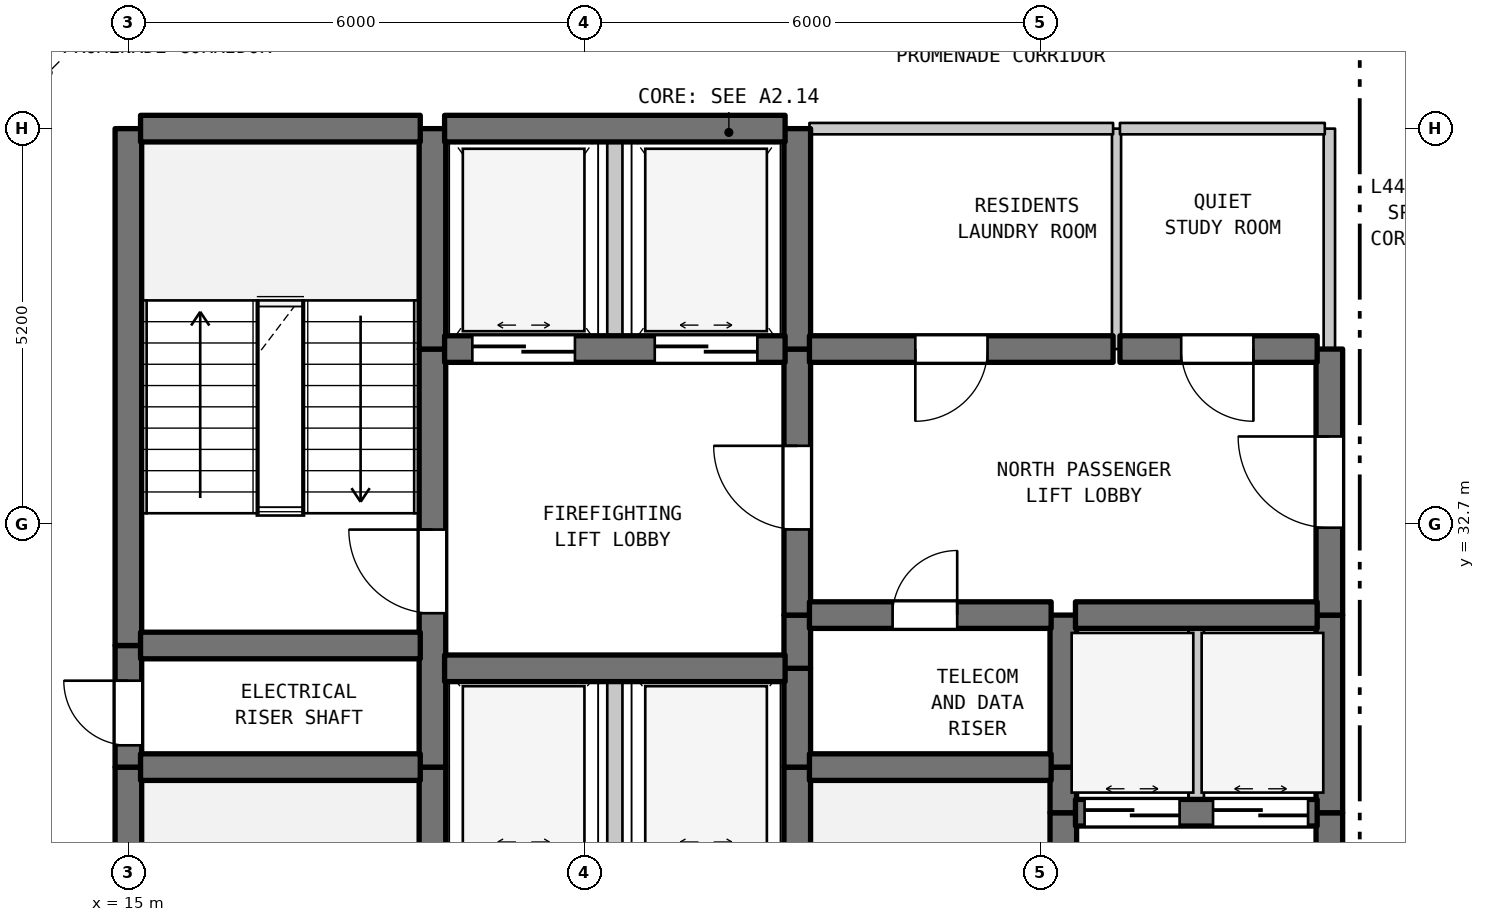
"""IFC4 building model, lengths in metres.
Left out: names, types, materials, properties, quantities, classifications, styles, units other than length and angle.
Written with IfcOpenShell. Run it as: python <this file> out.ifc"""

import sys

from ifc_helpers import new_model, si_unit, direction, frame, frame_2d, origin, place, context, subcontext, project, spatial, rectangle, extrude, element, fill, save


model = new_model("IFC4")
c1 = context("Model", 3, precision=1e-05, world=origin(), true_north=direction((0.0, 1.0)))
c2 = subcontext(c1, "Body", "Model", "MODEL_VIEW")
j1 = project(units=[si_unit("LENGTHUNIT", "METRE"), si_unit("PLANEANGLEUNIT", "RADIAN")], contexts=[c1])
p1 = place(None, origin())
s1 = spatial("IfcSite", under=j1, at=p1, CompositionType="ELEMENT")
p2 = place(p1, origin())
s2 = spatial("IfcBuilding", under=s1, at=p2, CompositionType="ELEMENT")
p3 = place(p2, frame((0.0, 0.0, 180.2)))
s3 = spatial("IfcBuildingStorey", under=s2, at=p3, CompositionType="ELEMENT", Elevation=180.2)
p4 = place(p3, frame((15.0, 22.7, 0.0), z_axis=(0.0, 0.0, 1.0), x_axis=(0.0, 1.0, 0.0)))
e1 = element("IfcWall", 1, at=p4, inside=s3, PredefinedType="SHEAR", context=c2, shape_type="SweptSolid", body=[
    extrude(rectangle(XDim=6.8, YDim=0.35, at=frame_2d((3.4, 0.0))), origin(), (0.0, 0.0, 1.0), 3.38),
])
p5 = place(p3, frame((15.0, 29.5, 0.0), z_axis=(0.0, 0.0, 1.0), x_axis=(0.0, 1.0, 0.0)))
e2 = element("IfcWall", 2, at=p5, inside=s3, PredefinedType="SHEAR", context=c2, shape_type="SweptSolid", body=[
    extrude(rectangle(XDim=1.6, YDim=0.35, at=frame_2d((0.8, 0.0))), origin(), (0.0, 0.0, 1.0), 3.38),
])
p6 = place(p5, frame((0.287, 0.0, 0.0)))
e3 = element("IfcOpeningElement", 3, at=p6, cuts=e2, PredefinedType="OPENING", context=c2, shape_type="SweptSolid", body=[
    extrude(rectangle(XDim=0.85, YDim=2.1, at=frame_2d((0.425, 1.05))), frame((0.0, 0.185, 0.0), z_axis=(0.0, -1.0, 0.0), x_axis=(1.0, 0.0, 0.0)), (0.0, 0.0, 1.0), 0.37),
])
p7 = place(p3, frame((15.0, 31.1, 0.0), z_axis=(0.0, 0.0, 1.0), x_axis=(0.0, 1.0, 0.0)))
e4 = element("IfcWall", 4, at=p7, inside=s3, PredefinedType="SHEAR", context=c2, shape_type="SweptSolid", body=[
    extrude(rectangle(XDim=6.8, YDim=0.35, at=frame_2d((3.4, 0.0))), origin(), (0.0, 0.0, 1.0), 3.38),
])
p8 = place(p3, frame((19.0, 28.2, 0.0), z_axis=(0.0, 0.0, 1.0), x_axis=(0.0, 1.0, 0.0)))
e5 = element("IfcWall", 5, at=p8, inside=s3, PredefinedType="SHEAR", context=c2, shape_type="SweptSolid", body=[
    extrude(rectangle(XDim=1.3, YDim=0.35, at=frame_2d((0.65, 0.0))), origin(), (0.0, 0.0, 1.0), 3.38),
])
p9 = place(p3, frame((19.0, 29.5, 0.0), z_axis=(0.0, 0.0, 1.0), x_axis=(0.0, 1.0, 0.0)))
e6 = element("IfcWall", 6, at=p9, inside=s3, PredefinedType="SHEAR", context=c2, shape_type="SweptSolid", body=[
    extrude(rectangle(XDim=5.5, YDim=0.35, at=frame_2d((2.75, 0.0))), origin(), (0.0, 0.0, 1.0), 3.38),
])
p10 = place(p9, frame((2.025, 0.0, 0.0)))
e7 = element("IfcOpeningElement", 7, at=p10, cuts=e6, PredefinedType="OPENING", context=c2, shape_type="SweptSolid", body=[
    extrude(rectangle(XDim=1.1, YDim=2.15, at=frame_2d((0.55, 1.075))), frame((0.0, 0.185, 0.0), z_axis=(0.0, -1.0, 0.0), x_axis=(1.0, 0.0, 0.0)), (0.0, 0.0, 1.0), 0.37),
])
p11 = place(p3, frame((19.0, 35.0, 0.0), z_axis=(0.0, 0.0, 1.0), x_axis=(0.0, 1.0, 0.0)))
e8 = element("IfcWall", 8, at=p11, inside=s3, PredefinedType="SHEAR", context=c2, shape_type="SweptSolid", body=[
    extrude(rectangle(XDim=2.9, YDim=0.35, at=frame_2d((1.45, 0.0))), origin(), (0.0, 0.0, 1.0), 3.38),
])
p12 = place(p3, frame((21.4, 28.2, 0.0), z_axis=(0.0, 0.0, 1.0), x_axis=(0.0, 1.0, 0.0)))
e9 = element("IfcWall", 9, at=p12, inside=s3, PredefinedType="STANDARD", context=c2, shape_type="SweptSolid", body=[
    extrude(rectangle(XDim=2.6, YDim=0.2, at=frame_2d((1.3, 0.0))), origin(), (0.0, 0.0, 1.0), 3.38),
])
p13 = place(p3, frame((21.4, 35.0, 0.0), z_axis=(0.0, 0.0, 1.0), x_axis=(0.0, 1.0, 0.0)))
e10 = element("IfcWall", 10, at=p13, inside=s3, PredefinedType="STANDARD", context=c2, shape_type="SweptSolid", body=[
    extrude(rectangle(XDim=2.9, YDim=0.2, at=frame_2d((1.45, 0.0))), origin(), (0.0, 0.0, 1.0), 3.38),
])
for number, where, z_axis, x_axis in (
    (11, (23.8, 28.2, 0.0), (0.0, 0.0, 1.0), (0.0, 1.0, 0.0)),
    (12, (23.8, 29.5, 0.0), (0.0, 0.0, 1.0), (0.0, 1.0, 0.0)),
):
    element("IfcWall", number, at=place(p3, frame(where, z_axis=z_axis, x_axis=x_axis)), inside=s3, PredefinedType="SHEAR", context=c2, shape_type="SweptSolid", body=[
        extrude(rectangle(XDim=1.3, YDim=0.35, at=frame_2d((0.65, 0.0))), origin(), (0.0, 0.0, 1.0), 3.38),
    ])
p14 = place(p3, frame((23.8, 30.8, 0.0), z_axis=(0.0, 0.0, 1.0), x_axis=(0.0, 1.0, 0.0)))
e13 = element("IfcWall", 13, at=p14, inside=s3, PredefinedType="SHEAR", context=c2, shape_type="SweptSolid", body=[
    extrude(rectangle(XDim=0.7, YDim=0.35, at=frame_2d((0.35, 0.0))), origin(), (0.0, 0.0, 1.0), 3.38),
])
p15 = place(p3, frame((23.8, 31.5, 0.0), z_axis=(0.0, 0.0, 1.0), x_axis=(0.0, 1.0, 0.0)))
e14 = element("IfcWall", 14, at=p15, inside=s3, PredefinedType="SHEAR", context=c2, shape_type="SweptSolid", body=[
    extrude(rectangle(XDim=3.5, YDim=0.35, at=frame_2d((1.75, 0.0))), origin(), (0.0, 0.0, 1.0), 3.38),
])
p16 = place(p15, frame((1.127, 0.0, 0.0)))
e15 = element("IfcOpeningElement", 15, at=p16, cuts=e14, PredefinedType="OPENING", context=c2, shape_type="SweptSolid", body=[
    extrude(rectangle(XDim=1.1, YDim=2.15, at=frame_2d((0.55, 1.075))), frame((0.0, 0.185, 0.0), z_axis=(0.0, -1.0, 0.0), x_axis=(1.0, 0.0, 0.0)), (0.0, 0.0, 1.0), 0.37),
])
p17 = place(p3, frame((23.8, 35.0, 0.0), z_axis=(0.0, 0.0, 1.0), x_axis=(0.0, 1.0, 0.0)))
e16 = element("IfcWall", 16, at=p17, inside=s3, PredefinedType="SHEAR", context=c2, shape_type="SweptSolid", body=[
    extrude(rectangle(XDim=2.9, YDim=0.35, at=frame_2d((1.45, 0.0))), origin(), (0.0, 0.0, 1.0), 3.38),
])
p18 = place(p3, frame((27.3, 25.6, 0.0), z_axis=(0.0, 0.0, 1.0), x_axis=(0.0, 1.0, 0.0)))
e17 = element("IfcWall", 17, at=p18, inside=s3, PredefinedType="SHEAR", context=c2, shape_type="SweptSolid", body=[
    extrude(rectangle(XDim=3.3, YDim=0.35, at=frame_2d((1.65, 0.0))), origin(), (0.0, 0.0, 1.0), 3.38),
])
p19 = place(p3, frame((27.3, 28.9, 0.0), z_axis=(0.0, 0.0, 1.0), x_axis=(0.0, 1.0, 0.0)))
e18 = element("IfcWall", 18, at=p19, inside=s3, PredefinedType="SHEAR", context=c2, shape_type="SweptSolid", body=[
    extrude(rectangle(XDim=0.6, YDim=0.35, at=frame_2d((0.3, 0.0))), origin(), (0.0, 0.0, 1.0), 3.38),
])
p20 = place(p3, frame((27.3, 29.5, 0.0), z_axis=(0.0, 0.0, 1.0), x_axis=(0.0, 1.0, 0.0)))
e19 = element("IfcWall", 19, at=p20, inside=s3, PredefinedType="SHEAR", context=c2, shape_type="SweptSolid", body=[
    extrude(rectangle(XDim=2.0, YDim=0.35, at=frame_2d((1.0, 0.0))), origin(), (0.0, 0.0, 1.0), 3.38),
])
p21 = place(p3, frame((28.0, 35.0, 0.0), z_axis=(0.0, 0.0, 1.0), x_axis=(0.0, 1.0, 0.0)))
e20 = element("IfcWall", 20, at=p21, inside=s3, PredefinedType="PARTITIONING", context=c2, shape_type="SweptSolid", body=[
    extrude(rectangle(XDim=2.9, YDim=0.12, at=frame_2d((1.45, 0.0))), origin(), (0.0, 0.0, 1.0), 3.38),
])
p22 = place(p3, frame((29.05, 28.9, 0.0), z_axis=(0.0, 0.0, 1.0), x_axis=(0.0, 1.0, 0.0)))
e21 = element("IfcWall", 21, at=p22, inside=s3, PredefinedType="STANDARD", context=c2, shape_type="SweptSolid", body=[
    extrude(rectangle(XDim=2.6, YDim=0.2, at=frame_2d((1.3, 0.0))), origin(), (0.0, 0.0, 1.0), 3.38),
])
p23 = place(p3, frame((30.8, 25.6, 0.0), z_axis=(0.0, 0.0, 1.0), x_axis=(0.0, 1.0, 0.0)))
e22 = element("IfcWall", 22, at=p23, inside=s3, PredefinedType="SHEAR", context=c2, shape_type="SweptSolid", body=[
    extrude(rectangle(XDim=3.3, YDim=0.35, at=frame_2d((1.65, 0.0))), origin(), (0.0, 0.0, 1.0), 3.38),
])
p24 = place(p23, frame((0.978, 0.0, 0.0)))
e23 = element("IfcOpeningElement", 23, at=p24, cuts=e22, PredefinedType="OPENING", context=c2, shape_type="SweptSolid", body=[
    extrude(rectangle(XDim=1.2, YDim=2.2, at=frame_2d((0.6, 1.1))), frame((0.0, 0.185, 0.0), z_axis=(0.0, -1.0, 0.0), x_axis=(1.0, 0.0, 0.0)), (0.0, 0.0, 1.0), 0.37),
])
p25 = place(p3, frame((30.8, 28.9, 0.0), z_axis=(0.0, 0.0, 1.0), x_axis=(0.0, 1.0, 0.0)))
e24 = element("IfcWall", 24, at=p25, inside=s3, PredefinedType="SHEAR", context=c2, shape_type="SweptSolid", body=[
    extrude(rectangle(XDim=2.6, YDim=0.35, at=frame_2d((1.3, 0.0))), origin(), (0.0, 0.0, 1.0), 3.38),
])
p26 = place(p3, frame((30.8, 31.5, 0.0), z_axis=(0.0, 0.0, 1.0), x_axis=(0.0, 1.0, 0.0)))
e25 = element("IfcWall", 25, at=p26, inside=s3, PredefinedType="SHEAR", context=c2, shape_type="SweptSolid", body=[
    extrude(rectangle(XDim=3.5, YDim=0.35, at=frame_2d((1.75, 0.0))), origin(), (0.0, 0.0, 1.0), 3.38),
])
p27 = place(p26, frame((1.15, 0.0, 0.0)))
e26 = element("IfcOpeningElement", 26, at=p27, cuts=e25, PredefinedType="OPENING", context=c2, shape_type="SweptSolid", body=[
    extrude(rectangle(XDim=1.2, YDim=2.2, at=frame_2d((0.6, 1.1))), frame((0.0, 0.185, 0.0), z_axis=(0.0, -1.0, 0.0), x_axis=(1.0, 0.0, 0.0)), (0.0, 0.0, 1.0), 0.37),
])
p28 = place(p3, frame((30.8, 35.0, 0.0), z_axis=(0.0, 0.0, 1.0), x_axis=(0.0, 1.0, 0.0)))
e27 = element("IfcWall", 27, at=p28, inside=s3, PredefinedType="STANDARD", context=c2, shape_type="SweptSolid", body=[
    extrude(rectangle(XDim=2.9, YDim=0.15, at=frame_2d((1.45, 0.0))), origin(), (0.0, 0.0, 1.0), 3.38),
])
p29 = place(p3, frame((27.46, 28.9, 0.0), z_axis=(0.0, 0.0, 1.0), x_axis=(1.0, 0.0, 0.0)))
e28 = element("IfcWall", 28, at=p29, inside=s3, PredefinedType="SHEAR", context=c2, shape_type="SweptSolid", body=[
    extrude(rectangle(XDim=3.18, YDim=0.35, at=frame_2d((1.59, 0.0))), origin(), (0.0, 0.0, 1.0), 3.38),
])
p30 = place(p29, frame((0.12, 0.0, 0.0)))
e29 = element("IfcOpeningElement", 29, at=p30, cuts=e28, PredefinedType="OPENING", context=c2, shape_type="SweptSolid", body=[
    extrude(rectangle(XDim=1.25, YDim=2.2, at=frame_2d((0.625, 1.1))), frame((0.0, 0.185, 0.0), z_axis=(0.0, -1.0, 0.0), x_axis=(1.0, 0.0, 0.0)), (0.0, 0.0, 1.0), 0.37),
])
p31 = place(p29, frame((1.81, 0.0, 0.0)))
e30 = element("IfcOpeningElement", 30, at=p31, cuts=e28, PredefinedType="OPENING", context=c2, shape_type="SweptSolid", body=[
    extrude(rectangle(XDim=1.25, YDim=2.2, at=frame_2d((0.625, 1.1))), frame((0.0, 0.185, 0.0), z_axis=(0.0, -1.0, 0.0), x_axis=(1.0, 0.0, 0.0)), (0.0, 0.0, 1.0), 0.37),
])
p32 = place(p3, frame((15.16, 29.5, 0.0), z_axis=(0.0, 0.0, 1.0), x_axis=(1.0, 0.0, 0.0)))
e31 = element("IfcWall", 31, at=p32, inside=s3, PredefinedType="SHEAR", context=c2, shape_type="SweptSolid", body=[
    extrude(rectangle(XDim=3.68, YDim=0.35, at=frame_2d((1.84, 0.0))), origin(), (0.0, 0.0, 1.0), 3.38),
])
p33 = place(p3, frame((23.96, 29.5, 0.0), z_axis=(0.0, 0.0, 1.0), x_axis=(1.0, 0.0, 0.0)))
e32 = element("IfcWall", 32, at=p33, inside=s3, PredefinedType="SHEAR", context=c2, shape_type="SweptSolid", body=[
    extrude(rectangle(XDim=3.18, YDim=0.35, at=frame_2d((1.59, 0.0))), origin(), (0.0, 0.0, 1.0), 3.38),
])
p34 = place(p3, frame((19.16, 30.8, 0.0), z_axis=(0.0, 0.0, 1.0), x_axis=(1.0, 0.0, 0.0)))
e33 = element("IfcWall", 33, at=p34, inside=s3, PredefinedType="SHEAR", context=c2, shape_type="SweptSolid", body=[
    extrude(rectangle(XDim=4.48, YDim=0.35, at=frame_2d((2.24, 0.0))), origin(), (0.0, 0.0, 1.0), 3.38),
])
p35 = place(p3, frame((15.16, 31.1, 0.0), z_axis=(0.0, 0.0, 1.0), x_axis=(1.0, 0.0, 0.0)))
e34 = element("IfcWall", 34, at=p35, inside=s3, PredefinedType="SHEAR", context=c2, shape_type="SweptSolid", body=[
    extrude(rectangle(XDim=3.68, YDim=0.35, at=frame_2d((1.84, 0.0))), origin(), (0.0, 0.0, 1.0), 3.38),
])
p36 = place(p3, frame((23.96, 31.5, 0.0), z_axis=(0.0, 0.0, 1.0), x_axis=(1.0, 0.0, 0.0)))
e35 = element("IfcWall", 35, at=p36, inside=s3, PredefinedType="SHEAR", context=c2, shape_type="SweptSolid", body=[
    extrude(rectangle(XDim=3.18, YDim=0.35, at=frame_2d((1.59, 0.0))), origin(), (0.0, 0.0, 1.0), 3.38),
])
p37 = place(p36, frame((1.094, 0.0, 0.0)))
e36 = element("IfcOpeningElement", 36, at=p37, cuts=e35, PredefinedType="OPENING", context=c2, shape_type="SweptSolid", body=[
    extrude(rectangle(XDim=0.85, YDim=2.1, at=frame_2d((0.425, 1.05))), frame((0.0, 0.185, 0.0), z_axis=(0.0, -1.0, 0.0), x_axis=(1.0, 0.0, 0.0)), (0.0, 0.0, 1.0), 0.37),
])
p38 = place(p3, frame((27.46, 31.5, 0.0), z_axis=(0.0, 0.0, 1.0), x_axis=(1.0, 0.0, 0.0)))
e37 = element("IfcWall", 37, at=p38, inside=s3, PredefinedType="SHEAR", context=c2, shape_type="SweptSolid", body=[
    extrude(rectangle(XDim=3.18, YDim=0.35, at=frame_2d((1.59, 0.0))), origin(), (0.0, 0.0, 1.0), 3.38),
])
p39 = place(p3, frame((19.16, 35.0, 0.0), z_axis=(0.0, 0.0, 1.0), x_axis=(1.0, 0.0, 0.0)))
e38 = element("IfcWall", 38, at=p39, inside=s3, PredefinedType="SHEAR", context=c2, shape_type="SweptSolid", body=[
    extrude(rectangle(XDim=4.48, YDim=0.35, at=frame_2d((2.24, 0.0))), origin(), (0.0, 0.0, 1.0), 3.38),
])
p40 = place(p39, frame((0.365, 0.0, 0.0)))
e39 = element("IfcOpeningElement", 39, at=p40, cuts=e38, PredefinedType="OPENING", context=c2, shape_type="SweptSolid", body=[
    extrude(rectangle(XDim=1.35, YDim=2.2, at=frame_2d((0.675, 1.1))), frame((0.0, 0.185, 0.0), z_axis=(0.0, -1.0, 0.0), x_axis=(1.0, 0.0, 0.0)), (0.0, 0.0, 1.0), 0.37),
])
p41 = place(p39, frame((2.765, 0.0, 0.0)))
e40 = element("IfcOpeningElement", 40, at=p41, cuts=e38, PredefinedType="OPENING", context=c2, shape_type="SweptSolid", body=[
    extrude(rectangle(XDim=1.35, YDim=2.2, at=frame_2d((0.675, 1.1))), frame((0.0, 0.185, 0.0), z_axis=(0.0, -1.0, 0.0), x_axis=(1.0, 0.0, 0.0)), (0.0, 0.0, 1.0), 0.37),
])
p42 = place(p3, frame((23.96, 35.0, 0.0), z_axis=(0.0, 0.0, 1.0), x_axis=(1.0, 0.0, 0.0)))
e41 = element("IfcWall", 41, at=p42, inside=s3, PredefinedType="SHEAR", context=c2, shape_type="SweptSolid", body=[
    extrude(rectangle(XDim=3.995, YDim=0.35, at=frame_2d((1.998, 0.0))), origin(), (0.0, 0.0, 1.0), 3.38),
])
p43 = place(p42, frame((1.393, 0.0, 0.0)))
e42 = element("IfcOpeningElement", 42, at=p43, cuts=e41, PredefinedType="OPENING", context=c2, shape_type="SweptSolid", body=[
    extrude(rectangle(XDim=0.95, YDim=2.15, at=frame_2d((0.475, 1.075))), frame((0.0, 0.185, 0.0), z_axis=(0.0, -1.0, 0.0), x_axis=(1.0, 0.0, 0.0)), (0.0, 0.0, 1.0), 0.37),
])
p44 = place(p3, frame((28.045, 35.0, 0.0), z_axis=(0.0, 0.0, 1.0), x_axis=(1.0, 0.0, 0.0)))
e43 = element("IfcWall", 43, at=p44, inside=s3, PredefinedType="SHEAR", context=c2, shape_type="SweptSolid", body=[
    extrude(rectangle(XDim=2.595, YDim=0.35, at=frame_2d((1.297, 0.0))), origin(), (0.0, 0.0, 1.0), 3.38),
])
p45 = place(p44, frame((0.806, 0.0, 0.0)))
e44 = element("IfcOpeningElement", 44, at=p45, cuts=e43, PredefinedType="OPENING", context=c2, shape_type="SweptSolid", body=[
    extrude(rectangle(XDim=0.95, YDim=2.15, at=frame_2d((0.475, 1.075))), frame((0.0, 0.185, 0.0), z_axis=(0.0, -1.0, 0.0), x_axis=(1.0, 0.0, 0.0)), (0.0, 0.0, 1.0), 0.37),
])
p46 = place(p3, frame((15.16, 37.9, 0.0), z_axis=(0.0, 0.0, 1.0), x_axis=(1.0, 0.0, 0.0)))
e45 = element("IfcWall", 45, at=p46, inside=s3, PredefinedType="SHEAR", context=c2, shape_type="SweptSolid", body=[
    extrude(rectangle(XDim=3.68, YDim=0.35, at=frame_2d((1.84, 0.0))), origin(), (0.0, 0.0, 1.0), 3.38),
])
p47 = place(p3, frame((19.16, 37.9, 0.0), z_axis=(0.0, 0.0, 1.0), x_axis=(1.0, 0.0, 0.0)))
e46 = element("IfcWall", 46, at=p47, inside=s3, PredefinedType="SHEAR", context=c2, shape_type="SweptSolid", body=[
    extrude(rectangle(XDim=4.48, YDim=0.35, at=frame_2d((2.24, 0.0))), origin(), (0.0, 0.0, 1.0), 3.38),
])
p48 = place(p3, frame((23.96, 37.9, 0.0), z_axis=(0.0, 0.0, 1.0), x_axis=(1.0, 0.0, 0.0)))
e47 = element("IfcWall", 47, at=p48, inside=s3, PredefinedType="STANDARD", context=c2, shape_type="SweptSolid", body=[
    extrude(rectangle(XDim=3.995, YDim=0.15, at=frame_2d((1.998, 0.0))), origin(), (0.0, 0.0, 1.0), 2.88),
])
p49 = place(p3, frame((28.045, 37.9, 0.0), z_axis=(0.0, 0.0, 1.0), x_axis=(1.0, 0.0, 0.0)))
e48 = element("IfcWall", 48, at=p49, inside=s3, PredefinedType="STANDARD", context=c2, shape_type="SweptSolid", body=[
    extrude(rectangle(XDim=2.695, YDim=0.15, at=frame_2d((1.348, 0.0))), origin(), (0.0, 0.0, 1.0), 2.88),
])
p50 = place(p6, origin())
e49 = element("IfcDoor", 49, at=p50, inside=s3, OperationType="SINGLE_SWING_RIGHT", PredefinedType="DOOR", context=c2, shape_type="SweptSolid", body=[
    extrude(rectangle(XDim=0.85, YDim=2.1, at=frame_2d((0.425, 1.05))), frame((0.0, 0.025, 0.0), z_axis=(0.0, -1.0, 0.0), x_axis=(1.0, 0.0, 0.0)), (0.0, 0.0, 1.0), 0.05),
])
fill(e3, e49)
p51 = place(p10, origin())
e50 = element("IfcDoor", 50, at=p51, inside=s3, OperationType="SINGLE_SWING_RIGHT", PredefinedType="DOOR", context=c2, shape_type="SweptSolid", body=[
    extrude(rectangle(XDim=1.1, YDim=2.15, at=frame_2d((0.55, 1.075))), frame((0.0, 0.025, 0.0), z_axis=(0.0, -1.0, 0.0), x_axis=(1.0, 0.0, 0.0)), (0.0, 0.0, 1.0), 0.05),
])
fill(e7, e50)
p52 = place(p16, origin())
e51 = element("IfcDoor", 51, at=p52, inside=s3, OperationType="SINGLE_SWING_RIGHT", PredefinedType="DOOR", context=c2, shape_type="SweptSolid", body=[
    extrude(rectangle(XDim=1.1, YDim=2.15, at=frame_2d((0.55, 1.075))), frame((0.0, 0.025, 0.0), z_axis=(0.0, -1.0, 0.0), x_axis=(1.0, 0.0, 0.0)), (0.0, 0.0, 1.0), 0.05),
])
fill(e15, e51)
p53 = place(p27, origin())
e52 = element("IfcDoor", 52, at=p53, inside=s3, OperationType="SINGLE_SWING_RIGHT", PredefinedType="DOOR", context=c2, shape_type="SweptSolid", body=[
    extrude(rectangle(XDim=1.2, YDim=2.2, at=frame_2d((0.6, 1.1))), frame((0.0, 0.025, 0.0), z_axis=(0.0, -1.0, 0.0), x_axis=(1.0, 0.0, 0.0)), (0.0, 0.0, 1.0), 0.05),
])
fill(e26, e52)
p54 = place(p30, origin())
e53 = element("IfcDoor", 53, at=p54, inside=s3, OperationType="DOUBLE_DOOR_SLIDING", PredefinedType="DOOR", context=c2, shape_type="SweptSolid", body=[
    extrude(rectangle(XDim=1.25, YDim=2.2, at=frame_2d((0.625, 1.1))), frame((0.0, 0.025, 0.0), z_axis=(0.0, -1.0, 0.0), x_axis=(1.0, 0.0, 0.0)), (0.0, 0.0, 1.0), 0.05),
])
fill(e29, e53)
p55 = place(p31, origin())
e54 = element("IfcDoor", 54, at=p55, inside=s3, OperationType="DOUBLE_DOOR_SLIDING", PredefinedType="DOOR", context=c2, shape_type="SweptSolid", body=[
    extrude(rectangle(XDim=1.25, YDim=2.2, at=frame_2d((0.625, 1.1))), frame((0.0, 0.025, 0.0), z_axis=(0.0, -1.0, 0.0), x_axis=(1.0, 0.0, 0.0)), (0.0, 0.0, 1.0), 0.05),
])
fill(e30, e54)
p56 = place(p37, origin())
e55 = element("IfcDoor", 55, at=p56, inside=s3, OperationType="SINGLE_SWING_RIGHT", PredefinedType="DOOR", context=c2, shape_type="SweptSolid", body=[
    extrude(rectangle(XDim=0.85, YDim=2.1, at=frame_2d((0.425, 1.05))), frame((0.0, 0.025, 0.0), z_axis=(0.0, -1.0, 0.0), x_axis=(1.0, 0.0, 0.0)), (0.0, 0.0, 1.0), 0.05),
])
fill(e36, e55)
p57 = place(p40, origin())
e56 = element("IfcDoor", 56, at=p57, inside=s3, OperationType="DOUBLE_DOOR_SLIDING", PredefinedType="DOOR", context=c2, shape_type="SweptSolid", body=[
    extrude(rectangle(XDim=1.35, YDim=2.2, at=frame_2d((0.675, 1.1))), frame((0.0, 0.025, 0.0), z_axis=(0.0, -1.0, 0.0), x_axis=(1.0, 0.0, 0.0)), (0.0, 0.0, 1.0), 0.05),
])
fill(e39, e56)
p58 = place(p41, origin())
e57 = element("IfcDoor", 57, at=p58, inside=s3, OperationType="DOUBLE_DOOR_SLIDING", PredefinedType="DOOR", context=c2, shape_type="SweptSolid", body=[
    extrude(rectangle(XDim=1.35, YDim=2.2, at=frame_2d((0.675, 1.1))), frame((0.0, 0.025, 0.0), z_axis=(0.0, -1.0, 0.0), x_axis=(1.0, 0.0, 0.0)), (0.0, 0.0, 1.0), 0.05),
])
fill(e40, e57)
p59 = place(p43, frame((0.95, 0.0, 0.0), z_axis=(0.0, 0.0, 1.0), x_axis=(-1.0, 0.0, 0.0)))
e58 = element("IfcDoor", 58, at=p59, inside=s3, OperationType="SINGLE_SWING_LEFT", PredefinedType="DOOR", context=c2, shape_type="SweptSolid", body=[
    extrude(rectangle(XDim=0.95, YDim=2.15, at=frame_2d((0.475, 1.075))), frame((0.0, 0.025, 0.0), z_axis=(0.0, -1.0, 0.0), x_axis=(1.0, 0.0, 0.0)), (0.0, 0.0, 1.0), 0.05),
])
fill(e42, e58)
p60 = place(p45, frame((0.95, 0.0, 0.0), z_axis=(0.0, 0.0, 1.0), x_axis=(-1.0, 0.0, 0.0)))
e59 = element("IfcDoor", 59, at=p60, inside=s3, OperationType="SINGLE_SWING_RIGHT", PredefinedType="DOOR", context=c2, shape_type="SweptSolid", body=[
    extrude(rectangle(XDim=0.95, YDim=2.15, at=frame_2d((0.475, 1.075))), frame((0.0, 0.025, 0.0), z_axis=(0.0, -1.0, 0.0), x_axis=(1.0, 0.0, 0.0)), (0.0, 0.0, 1.0), 0.05),
])
fill(e44, e59)
save(model, sys.argv[1])
